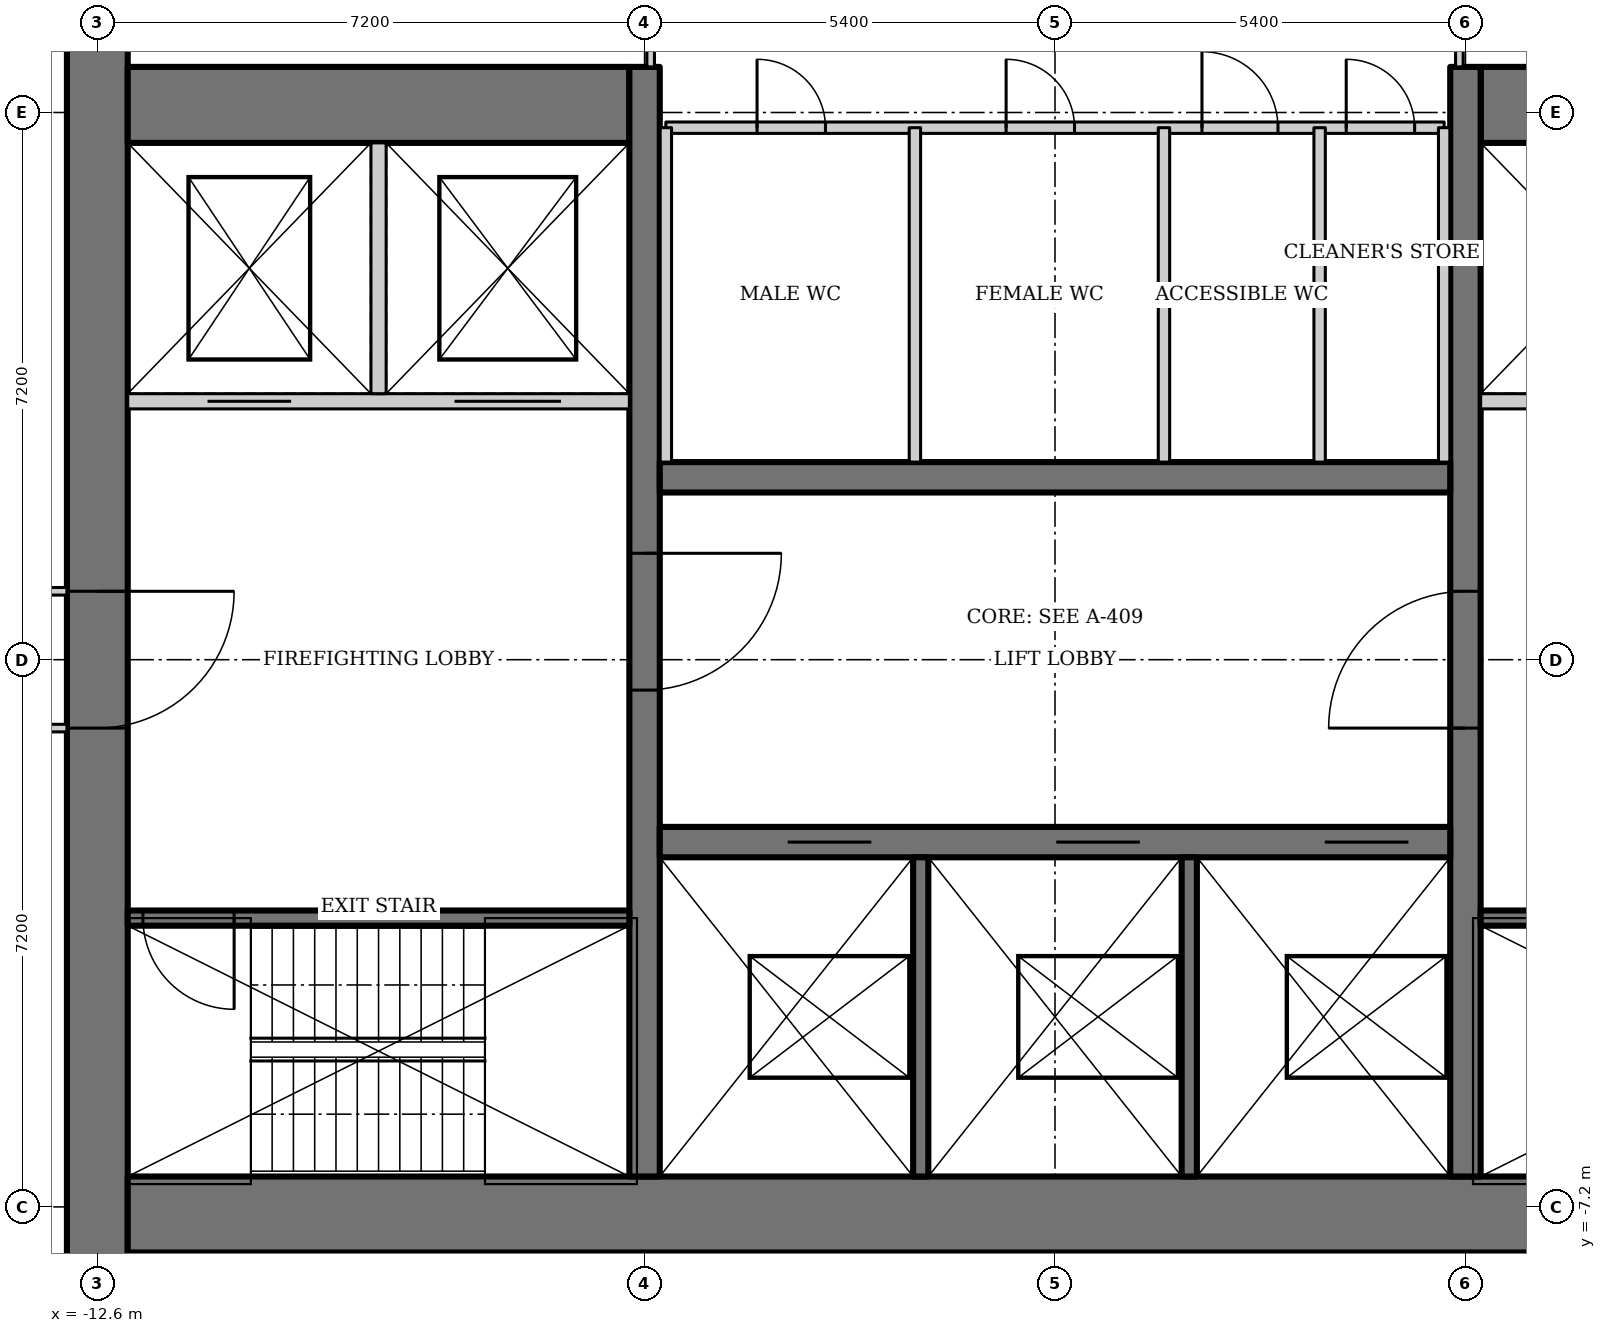
"""IFC4 building model, lengths in metres.
Left out: names, types, materials, properties, quantities, classifications, styles, units other than length and angle.
Written with IfcOpenShell. Run it as: python <this file> out.ifc"""

import sys

from ifc_helpers import new_model, si_unit, direction, frame, frame_2d, origin, place, context, subcontext, project, spatial, rectangle, extrude, element, fill, save


model = new_model("IFC4")
c1 = context("Model", 3, precision=1e-05, world=origin(), true_north=direction((0.0, 1.0)))
c2 = subcontext(c1, "Body", "Model", "MODEL_VIEW")
j1 = project(units=[si_unit("LENGTHUNIT", "METRE"), si_unit("PLANEANGLEUNIT", "RADIAN")], contexts=[c1])
p1 = place(None, origin())
s1 = spatial("IfcSite", under=j1, at=p1, CompositionType="ELEMENT")
p2 = place(p1, origin())
s2 = spatial("IfcBuilding", under=s1, at=p2, CompositionType="ELEMENT")
p3 = place(p2, frame((0.0, 0.0, 257.8)))
s3 = spatial("IfcBuildingStorey", under=s2, at=p3, CompositionType="ELEMENT", Elevation=257.8)
p4 = place(p3, frame((-12.6, 11.0, 0.0), z_axis=(0.0, 0.0, 1.0), x_axis=(0.0, -1.0, 0.0)))
e1 = element("IfcWall", 1, at=p4, inside=s3, PredefinedType="SHEAR", context=c2, shape_type="SweptSolid", body=[
    extrude(rectangle(XDim=22.0, YDim=0.8, at=frame_2d((11.0, 0.0))), origin(), (0.0, 0.0, 1.0), 4.2),
])
p5 = place(p4, frame((10.1, 0.0, 0.0)))
e2 = element("IfcOpeningElement", 2, at=p5, cuts=e1, PredefinedType="OPENING", context=c2, shape_type="SweptSolid", body=[
    extrude(rectangle(XDim=1.8, YDim=2.1, at=frame_2d((0.9, 1.05))), frame((0.0, 0.41, 0.0), z_axis=(0.0, -1.0, 0.0), x_axis=(1.0, 0.0, 0.0)), (0.0, 0.0, 1.0), 0.82),
])
p6 = place(p3, frame((-12.2, -7.3, 0.0), z_axis=(0.0, 0.0, 1.0), x_axis=(1.0, 0.0, 0.0)))
e3 = element("IfcWall", 3, at=p6, inside=s3, PredefinedType="SHEAR", context=c2, shape_type="SweptSolid", body=[
    extrude(rectangle(XDim=24.4, YDim=1.0, at=frame_2d((12.2, 0.0))), origin(), (0.0, 0.0, 1.0), 4.2),
])
for number, where, z_axis, x_axis in (
    (4, (12.2, 7.3, 0.0), (0.0, 0.0, 1.0), (-1.0, 0.0, 0.0)),
    (5, (-5.6, 7.3, 0.0), (0.0, 0.0, 1.0), (-1.0, 0.0, 0.0)),
):
    element("IfcWall", number, at=place(p3, frame(where, z_axis=z_axis, x_axis=x_axis)), inside=s3, PredefinedType="SHEAR", context=c2, shape_type="SweptSolid", body=[
        extrude(rectangle(XDim=6.6, YDim=1.0, at=frame_2d((3.3, 0.0))), origin(), (0.0, 0.0, 1.0), 4.2),
    ])
p7 = place(p3, frame((5.4, -6.8, 0.0), z_axis=(0.0, 0.0, 1.0), x_axis=(0.0, 1.0, 0.0)))
e6 = element("IfcWall", 6, at=p7, inside=s3, PredefinedType="SHEAR", context=c2, shape_type="SweptSolid", body=[
    extrude(rectangle(XDim=14.6, YDim=0.4, at=frame_2d((7.3, 0.0))), origin(), (0.0, 0.0, 1.0), 4.2),
])
p8 = place(p7, frame((5.9, 0.0, 0.0)))
e7 = element("IfcOpeningElement", 7, at=p8, cuts=e6, PredefinedType="OPENING", context=c2, shape_type="SweptSolid", body=[
    extrude(rectangle(XDim=1.8, YDim=2.1, at=frame_2d((0.9, 1.05))), frame((0.0, 0.21, 0.0), z_axis=(0.0, -1.0, 0.0), x_axis=(1.0, 0.0, 0.0)), (0.0, 0.0, 1.0), 0.42),
])
p9 = place(p3, frame((-5.4, 7.8, 0.0), z_axis=(0.0, 0.0, 1.0), x_axis=(0.0, -1.0, 0.0)))
e8 = element("IfcWall", 8, at=p9, inside=s3, PredefinedType="SHEAR", context=c2, shape_type="SweptSolid", body=[
    extrude(rectangle(XDim=14.6, YDim=0.4, at=frame_2d((7.3, 0.0))), origin(), (0.0, 0.0, 1.0), 4.2),
])
p10 = place(p9, frame((6.4, 0.0, 0.0)))
e9 = element("IfcOpeningElement", 9, at=p10, cuts=e8, PredefinedType="OPENING", context=c2, shape_type="SweptSolid", body=[
    extrude(rectangle(XDim=1.8, YDim=2.1, at=frame_2d((0.9, 1.05))), frame((0.0, 0.21, 0.0), z_axis=(0.0, -1.0, 0.0), x_axis=(1.0, 0.0, 0.0)), (0.0, 0.0, 1.0), 0.42),
])
p11 = place(p3, frame((-5.2, -2.4, 0.0), z_axis=(0.0, 0.0, 1.0), x_axis=(1.0, 0.0, 0.0)))
e10 = element("IfcWall", 10, at=p11, inside=s3, PredefinedType="SHEAR", context=c2, shape_type="SweptSolid", body=[
    extrude(rectangle(XDim=10.4, YDim=0.4, at=frame_2d((5.2, 0.0))), origin(), (0.0, 0.0, 1.0), 4.2),
])
p12 = place(p11, frame((1.683, 0.0, 0.0)))
e11 = element("IfcOpeningElement", 11, at=p12, cuts=e10, PredefinedType="OPENING", context=c2, shape_type="SweptSolid", body=[
    extrude(rectangle(XDim=1.1, YDim=2.2, at=frame_2d((0.55, 1.1))), frame((0.0, 0.21, 0.0), z_axis=(0.0, -1.0, 0.0), x_axis=(1.0, 0.0, 0.0)), (0.0, 0.0, 1.0), 0.42),
])
p13 = place(p11, frame((5.217, 0.0, 0.0)))
e12 = element("IfcOpeningElement", 12, at=p13, cuts=e10, PredefinedType="OPENING", context=c2, shape_type="SweptSolid", body=[
    extrude(rectangle(XDim=1.1, YDim=2.2, at=frame_2d((0.55, 1.1))), frame((0.0, 0.21, 0.0), z_axis=(0.0, -1.0, 0.0), x_axis=(1.0, 0.0, 0.0)), (0.0, 0.0, 1.0), 0.42),
])
p14 = place(p11, frame((8.75, 0.0, 0.0)))
e13 = element("IfcOpeningElement", 13, at=p14, cuts=e10, PredefinedType="OPENING", context=c2, shape_type="SweptSolid", body=[
    extrude(rectangle(XDim=1.1, YDim=2.2, at=frame_2d((0.55, 1.1))), frame((0.0, 0.21, 0.0), z_axis=(0.0, -1.0, 0.0), x_axis=(1.0, 0.0, 0.0)), (0.0, 0.0, 1.0), 0.42),
])
for number, where, z_axis, x_axis in (
    (14, (-1.767, -2.6, 0.0), (0.0, 0.0, 1.0), (0.0, -1.0, 0.0)),
    (15, (1.767, -2.6, 0.0), (0.0, 0.0, 1.0), (0.0, -1.0, 0.0)),
):
    element("IfcWall", number, at=place(p3, frame(where, z_axis=z_axis, x_axis=x_axis)), inside=s3, PredefinedType="SOLIDWALL", context=c2, shape_type="SweptSolid", body=[
        extrude(rectangle(XDim=4.2, YDim=0.2, at=frame_2d((2.1, 0.0))), origin(), (0.0, 0.0, 1.0), 4.2),
    ])
p15 = place(p3, frame((5.2, 2.4, 0.0), z_axis=(0.0, 0.0, 1.0), x_axis=(-1.0, 0.0, 0.0)))
e16 = element("IfcWall", 16, at=p15, inside=s3, PredefinedType="SHEAR", context=c2, shape_type="SweptSolid", body=[
    extrude(rectangle(XDim=10.4, YDim=0.4, at=frame_2d((5.2, 0.0))), origin(), (0.0, 0.0, 1.0), 4.2),
])
p16 = place(p3, frame((5.6, -3.4, 0.0), z_axis=(0.0, 0.0, 1.0), x_axis=(1.0, 0.0, 0.0)))
e17 = element("IfcWall", 17, at=p16, inside=s3, PredefinedType="SHEAR", context=c2, shape_type="SweptSolid", body=[
    extrude(rectangle(XDim=6.6, YDim=0.2, at=frame_2d((3.3, 0.0))), origin(), (0.0, 0.0, 1.0), 4.2),
])
p17 = place(p16, frame((5.2, 0.0, 0.0)))
e18 = element("IfcOpeningElement", 18, at=p17, cuts=e17, PredefinedType="OPENING", context=c2, shape_type="SweptSolid", body=[
    extrude(rectangle(XDim=1.2, YDim=2.1, at=frame_2d((0.6, 1.05))), frame((0.0, 0.11, 0.0), z_axis=(0.0, -1.0, 0.0), x_axis=(1.0, 0.0, 0.0)), (0.0, 0.0, 1.0), 0.22),
])
p18 = place(p3, frame((12.2, 3.4, 0.0), z_axis=(0.0, 0.0, 1.0), x_axis=(-1.0, 0.0, 0.0)))
e19 = element("IfcWall", 19, at=p18, inside=s3, PredefinedType="SOLIDWALL", context=c2, shape_type="SweptSolid", body=[
    extrude(rectangle(XDim=6.6, YDim=0.2, at=frame_2d((3.3, 0.0))), origin(), (0.0, 0.0, 1.0), 4.2),
])
p19 = place(p18, frame((4.45, 0.0, 0.0)))
e20 = element("IfcOpeningElement", 20, at=p19, cuts=e19, PredefinedType="OPENING", context=c2, shape_type="SweptSolid", body=[
    extrude(rectangle(XDim=1.1, YDim=2.2, at=frame_2d((0.55, 1.1))), frame((0.0, 0.11, 0.0), z_axis=(0.0, -1.0, 0.0), x_axis=(1.0, 0.0, 0.0)), (0.0, 0.0, 1.0), 0.22),
])
p20 = place(p18, frame((0.9, 0.0, 0.0)))
e21 = element("IfcOpeningElement", 21, at=p20, cuts=e19, PredefinedType="OPENING", context=c2, shape_type="SweptSolid", body=[
    extrude(rectangle(XDim=1.4, YDim=2.2, at=frame_2d((0.7, 1.1))), frame((0.0, 0.11, 0.0), z_axis=(0.0, -1.0, 0.0), x_axis=(1.0, 0.0, 0.0)), (0.0, 0.0, 1.0), 0.22),
])
p21 = place(p3, frame((-5.6, -3.4, 0.0), z_axis=(0.0, 0.0, 1.0), x_axis=(-1.0, 0.0, 0.0)))
e22 = element("IfcWall", 22, at=p21, inside=s3, PredefinedType="SHEAR", context=c2, shape_type="SweptSolid", body=[
    extrude(rectangle(XDim=6.6, YDim=0.2, at=frame_2d((3.3, 0.0))), origin(), (0.0, 0.0, 1.0), 4.2),
])
p22 = place(p21, frame((5.2, 0.0, 0.0)))
e23 = element("IfcOpeningElement", 23, at=p22, cuts=e22, PredefinedType="OPENING", context=c2, shape_type="SweptSolid", body=[
    extrude(rectangle(XDim=1.2, YDim=2.1, at=frame_2d((0.6, 1.05))), frame((0.0, 0.11, 0.0), z_axis=(0.0, -1.0, 0.0), x_axis=(1.0, 0.0, 0.0)), (0.0, 0.0, 1.0), 0.22),
])
p23 = place(p3, frame((-12.2, 3.4, 0.0), z_axis=(0.0, 0.0, 1.0), x_axis=(1.0, 0.0, 0.0)))
e24 = element("IfcWall", 24, at=p23, inside=s3, PredefinedType="SOLIDWALL", context=c2, shape_type="SweptSolid", body=[
    extrude(rectangle(XDim=6.6, YDim=0.2, at=frame_2d((3.3, 0.0))), origin(), (0.0, 0.0, 1.0), 4.2),
])
p24 = place(p23, frame((1.05, 0.0, 0.0)))
e25 = element("IfcOpeningElement", 25, at=p24, cuts=e24, PredefinedType="OPENING", context=c2, shape_type="SweptSolid", body=[
    extrude(rectangle(XDim=1.1, YDim=2.2, at=frame_2d((0.55, 1.1))), frame((0.0, 0.11, 0.0), z_axis=(0.0, -1.0, 0.0), x_axis=(1.0, 0.0, 0.0)), (0.0, 0.0, 1.0), 0.22),
])
p25 = place(p23, frame((4.3, 0.0, 0.0)))
e26 = element("IfcOpeningElement", 26, at=p25, cuts=e24, PredefinedType="OPENING", context=c2, shape_type="SweptSolid", body=[
    extrude(rectangle(XDim=1.4, YDim=2.2, at=frame_2d((0.7, 1.1))), frame((0.0, 0.11, 0.0), z_axis=(0.0, -1.0, 0.0), x_axis=(1.0, 0.0, 0.0)), (0.0, 0.0, 1.0), 0.22),
])
p26 = place(p3, frame((-8.9, 3.5, 0.0), z_axis=(0.0, 0.0, 1.0), x_axis=(0.0, 1.0, 0.0)))
e27 = element("IfcWall", 27, at=p26, inside=s3, PredefinedType="SOLIDWALL", context=c2, shape_type="SweptSolid", body=[
    extrude(rectangle(XDim=3.3, YDim=0.2, at=frame_2d((1.65, 0.0))), origin(), (0.0, 0.0, 1.0), 4.2),
])
p27 = place(p3, frame((-5.12, 7.0, 0.0), z_axis=(0.0, 0.0, 1.0), x_axis=(1.0, 0.0, 0.0)))
e28 = element("IfcWall", 28, at=p27, inside=s3, PredefinedType="SOLIDWALL", context=c2, shape_type="SweptSolid", body=[
    extrude(rectangle(XDim=10.24, YDim=0.15, at=frame_2d((5.12, 0.0))), origin(), (0.0, 0.0, 1.0), 4.05),
])
p28 = place(p27, frame((1.2, 0.0, 0.0)))
e29 = element("IfcOpeningElement", 29, at=p28, cuts=e28, PredefinedType="OPENING", context=c2, shape_type="SweptSolid", body=[
    extrude(rectangle(XDim=0.9, YDim=2.1, at=frame_2d((0.45, 1.05))), frame((0.0, 0.085, 0.0), z_axis=(0.0, -1.0, 0.0), x_axis=(1.0, 0.0, 0.0)), (0.0, 0.0, 1.0), 0.17),
])
p29 = place(p27, frame((4.477, 0.0, 0.0)))
e30 = element("IfcOpeningElement", 30, at=p29, cuts=e28, PredefinedType="OPENING", context=c2, shape_type="SweptSolid", body=[
    extrude(rectangle(XDim=0.9, YDim=2.1, at=frame_2d((0.45, 1.05))), frame((0.0, 0.085, 0.0), z_axis=(0.0, -1.0, 0.0), x_axis=(1.0, 0.0, 0.0)), (0.0, 0.0, 1.0), 0.17),
])
p30 = place(p27, frame((7.054, 0.0, 0.0)))
e31 = element("IfcOpeningElement", 31, at=p30, cuts=e28, PredefinedType="OPENING", context=c2, shape_type="SweptSolid", body=[
    extrude(rectangle(XDim=1.0, YDim=2.1, at=frame_2d((0.5, 1.05))), frame((0.0, 0.085, 0.0), z_axis=(0.0, -1.0, 0.0), x_axis=(1.0, 0.0, 0.0)), (0.0, 0.0, 1.0), 0.17),
])
p31 = place(p27, frame((8.952, 0.0, 0.0)))
e32 = element("IfcOpeningElement", 32, at=p31, cuts=e28, PredefinedType="OPENING", context=c2, shape_type="SweptSolid", body=[
    extrude(rectangle(XDim=0.9, YDim=2.1, at=frame_2d((0.45, 1.05))), frame((0.0, 0.085, 0.0), z_axis=(0.0, -1.0, 0.0), x_axis=(1.0, 0.0, 0.0)), (0.0, 0.0, 1.0), 0.17),
])
for number, where, z_axis, x_axis in (
    (33, (-5.12, 2.6, 0.0), (0.0, 0.0, 1.0), (0.0, 1.0, 0.0)),
    (34, (5.12, 2.6, 0.0), (0.0, 0.0, 1.0), (0.0, 1.0, 0.0)),
    (35, (-1.843, 2.6, 0.0), (0.0, 0.0, 1.0), (0.0, 1.0, 0.0)),
):
    element("IfcWall", number, at=place(p3, frame(where, z_axis=z_axis, x_axis=x_axis)), inside=s3, PredefinedType="SOLIDWALL", context=c2, shape_type="SweptSolid", body=[
        extrude(rectangle(XDim=4.4, YDim=0.15, at=frame_2d((2.2, 0.0))), origin(), (0.0, 0.0, 1.0), 4.05),
    ])
p32 = place(p3, frame((1.434, 2.6, 0.0), z_axis=(0.0, 0.0, 1.0), x_axis=(0.0, 1.0, 0.0)))
e36 = element("IfcWall", 36, at=p32, inside=s3, PredefinedType="SOLIDWALL", context=c2, shape_type="SweptSolid", body=[
    extrude(rectangle(XDim=4.4, YDim=0.15, at=frame_2d((2.2, 0.0))), origin(), (0.0, 0.0, 1.0), 3.108),
])
p33 = place(p3, frame((3.482, 2.6, 0.0), z_axis=(0.0, 0.0, 1.0), x_axis=(0.0, 1.0, 0.0)))
e37 = element("IfcWall", 37, at=p33, inside=s3, PredefinedType="SOLIDWALL", context=c2, shape_type="SweptSolid", body=[
    extrude(rectangle(XDim=4.4, YDim=0.15, at=frame_2d((2.2, 0.0))), origin(), (0.0, 0.0, 1.0), 4.05),
])
for number, where, z_axis, x_axis in (
    (38, (5.32, 7.8, 0.0), (0.0, 0.0, 1.0), (0.0, 1.0, 0.0)),
    (39, (-5.32, 8.8, 0.0), (0.0, 0.0, 1.0), (0.0, -1.0, 0.0)),
):
    element("IfcWall", number, at=place(p3, frame(where, z_axis=z_axis, x_axis=x_axis)), inside=s3, PredefinedType="PARTITIONING", context=c2, shape_type="SweptSolid", body=[
        extrude(rectangle(XDim=1.0, YDim=0.1, at=frame_2d((0.5, 0.0))), origin(), (0.0, 0.0, 1.0), 4.05),
    ])
p34 = place(p3, frame((-15.165, -0.9, 0.0), z_axis=(0.0, 0.0, 1.0), x_axis=(1.0, 0.0, 0.0)))
e40 = element("IfcWall", 40, at=p34, inside=s3, PredefinedType="PARTITIONING", context=c2, shape_type="SweptSolid", body=[
    extrude(rectangle(XDim=2.165, YDim=0.1, at=frame_2d((1.083, 0.0))), origin(), (0.0, 0.0, 1.0), 4.05),
])
p35 = place(p34, frame((0.1, 0.0, 0.0)))
e41 = element("IfcOpeningElement", 41, at=p35, cuts=e40, PredefinedType="OPENING", context=c2, shape_type="SweptSolid", body=[
    extrude(rectangle(XDim=0.9, YDim=2.1, at=frame_2d((0.45, 1.05))), frame((0.0, 0.06, 0.0), z_axis=(0.0, -1.0, 0.0), x_axis=(1.0, 0.0, 0.0)), (0.0, 0.0, 1.0), 0.12),
])
p36 = place(p3, frame((-13.0, 0.9, 0.0), z_axis=(0.0, 0.0, 1.0), x_axis=(-1.0, 0.0, 0.0)))
e42 = element("IfcWall", 42, at=p36, inside=s3, PredefinedType="PARTITIONING", context=c2, shape_type="SweptSolid", body=[
    extrude(rectangle(XDim=2.165, YDim=0.1, at=frame_2d((1.083, 0.0))), origin(), (0.0, 0.0, 1.0), 4.05),
])
p37 = place(p36, frame((1.15, 0.0, 0.0)))
e43 = element("IfcOpeningElement", 43, at=p37, cuts=e42, PredefinedType="OPENING", context=c2, shape_type="SweptSolid", body=[
    extrude(rectangle(XDim=0.9, YDim=2.1, at=frame_2d((0.45, 1.05))), frame((0.0, 0.06, 0.0), z_axis=(0.0, -1.0, 0.0), x_axis=(1.0, 0.0, 0.0)), (0.0, 0.0, 1.0), 0.12),
])
p38 = place(p8, origin())
e44 = element("IfcDoor", 44, at=p38, inside=s3, OperationType="DOUBLE_DOOR_DOUBLE_SWING", PredefinedType="DOOR", context=c2, shape_type="SweptSolid", body=[
    extrude(rectangle(XDim=1.8, YDim=2.1, at=frame_2d((0.9, 1.05))), frame((0.0, 0.025, 0.0), z_axis=(0.0, -1.0, 0.0), x_axis=(1.0, 0.0, 0.0)), (0.0, 0.0, 1.0), 0.05),
])
fill(e7, e44)
p39 = place(p10, origin())
e45 = element("IfcDoor", 45, at=p39, inside=s3, OperationType="DOUBLE_DOOR_DOUBLE_SWING", PredefinedType="DOOR", context=c2, shape_type="SweptSolid", body=[
    extrude(rectangle(XDim=1.8, YDim=2.1, at=frame_2d((0.9, 1.05))), frame((0.0, 0.025, 0.0), z_axis=(0.0, -1.0, 0.0), x_axis=(1.0, 0.0, 0.0)), (0.0, 0.0, 1.0), 0.05),
])
fill(e9, e45)
p40 = place(p22, origin())
e46 = element("IfcDoor", 46, at=p40, inside=s3, OperationType="SINGLE_SWING_RIGHT", PredefinedType="DOOR", context=c2, shape_type="SweptSolid", body=[
    extrude(rectangle(XDim=1.2, YDim=2.1, at=frame_2d((0.6, 1.05))), frame((0.0, 0.025, 0.0), z_axis=(0.0, -1.0, 0.0), x_axis=(1.0, 0.0, 0.0)), (0.0, 0.0, 1.0), 0.05),
])
fill(e23, e46)
p41 = place(p5, origin())
e47 = element("IfcDoor", 47, at=p41, inside=s3, OperationType="DOUBLE_DOOR_DOUBLE_SWING", PredefinedType="DOOR", context=c2, shape_type="SweptSolid", body=[
    extrude(rectangle(XDim=1.8, YDim=2.1, at=frame_2d((0.9, 1.05))), frame((0.0, 0.025, 0.0), z_axis=(0.0, -1.0, 0.0), x_axis=(1.0, 0.0, 0.0)), (0.0, 0.0, 1.0), 0.05),
])
fill(e2, e47)
p42 = place(p12, origin())
e48 = element("IfcDoor", 48, at=p42, inside=s3, OperationType="DOUBLE_DOOR_SLIDING", PredefinedType="DOOR", context=c2, shape_type="SweptSolid", body=[
    extrude(rectangle(XDim=1.1, YDim=2.2, at=frame_2d((0.55, 1.1))), frame((0.0, 0.025, 0.0), z_axis=(0.0, -1.0, 0.0), x_axis=(1.0, 0.0, 0.0)), (0.0, 0.0, 1.0), 0.05),
])
fill(e11, e48)
p43 = place(p13, origin())
e49 = element("IfcDoor", 49, at=p43, inside=s3, OperationType="DOUBLE_DOOR_SLIDING", PredefinedType="DOOR", context=c2, shape_type="SweptSolid", body=[
    extrude(rectangle(XDim=1.1, YDim=2.2, at=frame_2d((0.55, 1.1))), frame((0.0, 0.025, 0.0), z_axis=(0.0, -1.0, 0.0), x_axis=(1.0, 0.0, 0.0)), (0.0, 0.0, 1.0), 0.05),
])
fill(e12, e49)
p44 = place(p14, origin())
e50 = element("IfcDoor", 50, at=p44, inside=s3, OperationType="DOUBLE_DOOR_SLIDING", PredefinedType="DOOR", context=c2, shape_type="SweptSolid", body=[
    extrude(rectangle(XDim=1.1, YDim=2.2, at=frame_2d((0.55, 1.1))), frame((0.0, 0.025, 0.0), z_axis=(0.0, -1.0, 0.0), x_axis=(1.0, 0.0, 0.0)), (0.0, 0.0, 1.0), 0.05),
])
fill(e13, e50)
p45 = place(p24, origin())
e51 = element("IfcDoor", 51, at=p45, inside=s3, OperationType="DOUBLE_DOOR_SLIDING", PredefinedType="DOOR", context=c2, shape_type="SweptSolid", body=[
    extrude(rectangle(XDim=1.1, YDim=2.2, at=frame_2d((0.55, 1.1))), frame((0.0, 0.025, 0.0), z_axis=(0.0, -1.0, 0.0), x_axis=(1.0, 0.0, 0.0)), (0.0, 0.0, 1.0), 0.05),
])
fill(e25, e51)
p46 = place(p25, origin())
e52 = element("IfcDoor", 52, at=p46, inside=s3, OperationType="DOUBLE_DOOR_SLIDING", PredefinedType="DOOR", context=c2, shape_type="SweptSolid", body=[
    extrude(rectangle(XDim=1.4, YDim=2.2, at=frame_2d((0.7, 1.1))), frame((0.0, 0.025, 0.0), z_axis=(0.0, -1.0, 0.0), x_axis=(1.0, 0.0, 0.0)), (0.0, 0.0, 1.0), 0.05),
])
fill(e26, e52)
p47 = place(p28, origin())
e53 = element("IfcDoor", 53, at=p47, inside=s3, OperationType="SINGLE_SWING_LEFT", PredefinedType="DOOR", context=c2, shape_type="SweptSolid", body=[
    extrude(rectangle(XDim=0.9, YDim=2.1, at=frame_2d((0.45, 1.05))), frame((0.0, 0.025, 0.0), z_axis=(0.0, -1.0, 0.0), x_axis=(1.0, 0.0, 0.0)), (0.0, 0.0, 1.0), 0.05),
])
fill(e29, e53)
p48 = place(p29, origin())
e54 = element("IfcDoor", 54, at=p48, inside=s3, OperationType="SINGLE_SWING_LEFT", PredefinedType="DOOR", context=c2, shape_type="SweptSolid", body=[
    extrude(rectangle(XDim=0.9, YDim=2.1, at=frame_2d((0.45, 1.05))), frame((0.0, 0.025, 0.0), z_axis=(0.0, -1.0, 0.0), x_axis=(1.0, 0.0, 0.0)), (0.0, 0.0, 1.0), 0.05),
])
fill(e30, e54)
p49 = place(p30, origin())
e55 = element("IfcDoor", 55, at=p49, inside=s3, OperationType="SINGLE_SWING_LEFT", PredefinedType="DOOR", context=c2, shape_type="SweptSolid", body=[
    extrude(rectangle(XDim=1.0, YDim=2.1, at=frame_2d((0.5, 1.05))), frame((0.0, 0.025, 0.0), z_axis=(0.0, -1.0, 0.0), x_axis=(1.0, 0.0, 0.0)), (0.0, 0.0, 1.0), 0.05),
])
fill(e31, e55)
p50 = place(p31, origin())
e56 = element("IfcDoor", 56, at=p50, inside=s3, OperationType="SINGLE_SWING_LEFT", PredefinedType="DOOR", context=c2, shape_type="SweptSolid", body=[
    extrude(rectangle(XDim=0.9, YDim=2.1, at=frame_2d((0.45, 1.05))), frame((0.0, 0.025, 0.0), z_axis=(0.0, -1.0, 0.0), x_axis=(1.0, 0.0, 0.0)), (0.0, 0.0, 1.0), 0.05),
])
fill(e32, e56)
save(model, sys.argv[1])
